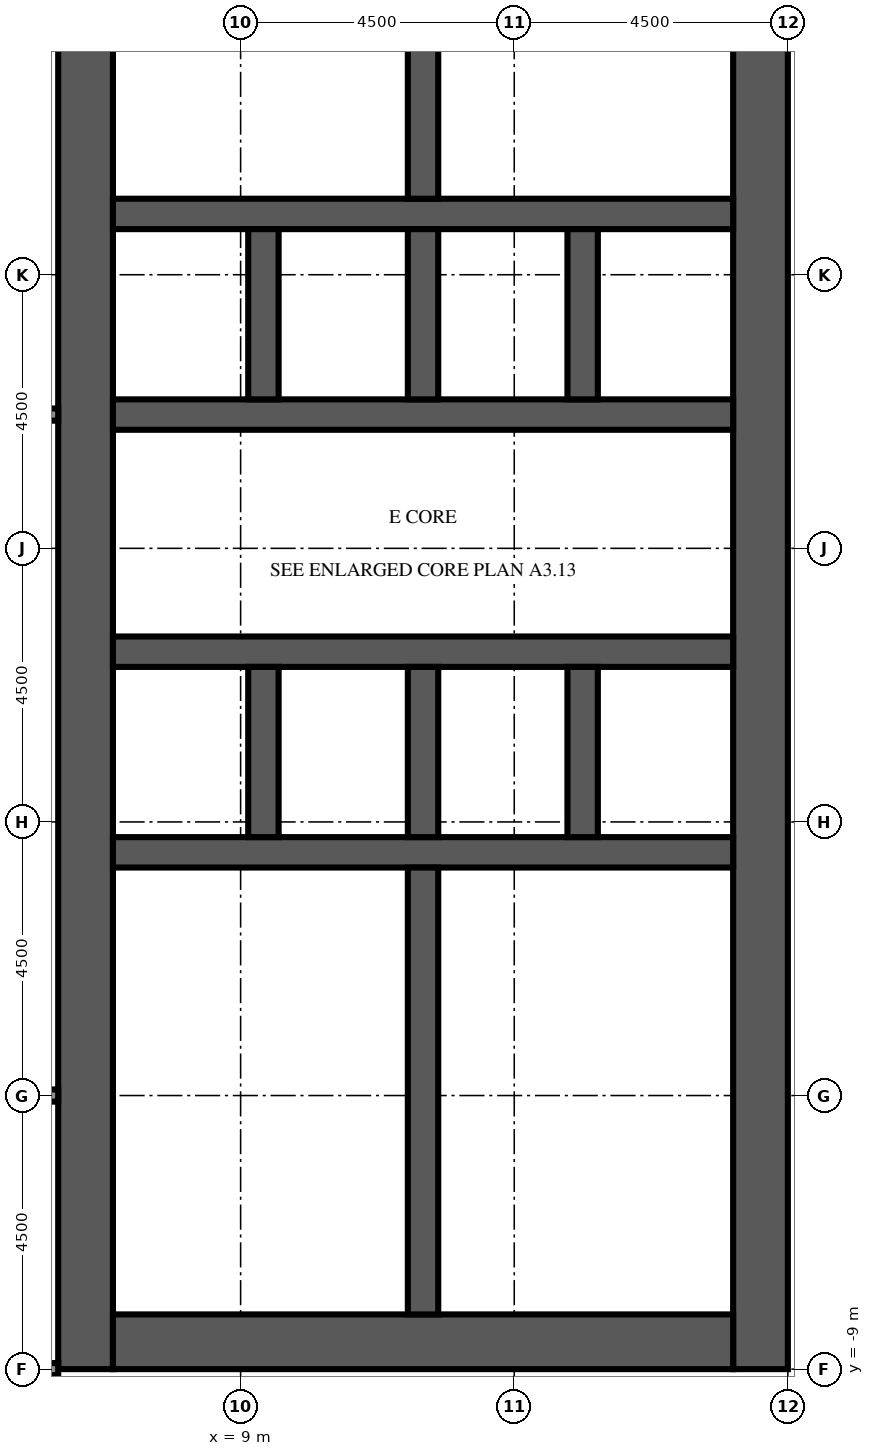
"""IFC4 building model, lengths in metres.
Left out: names, types, materials, properties, quantities, classifications, styles, units other than length and angle.
Written with IfcOpenShell. Run it as: python <this file> out.ifc"""

import sys

from ifc_helpers import new_model, si_unit, direction, frame, frame_2d, origin, place, context, subcontext, project, spatial, rectangle, extrude, element, fill, save


model = new_model("IFC4")
c1 = context("Model", 3, precision=1e-05, world=origin(), true_north=direction((0.0, 1.0)))
c2 = subcontext(c1, "Body", "Model", "MODEL_VIEW")
j1 = project(units=[si_unit("LENGTHUNIT", "METRE"), si_unit("PLANEANGLEUNIT", "RADIAN")], contexts=[c1])
p1 = place(None, origin())
s1 = spatial("IfcSite", under=j1, at=p1, CompositionType="ELEMENT")
p2 = place(p1, origin())
s2 = spatial("IfcBuilding", under=s1, at=p2, CompositionType="ELEMENT")
p3 = place(p2, frame((0.0, 0.0, 76.6)))
s3 = spatial("IfcBuildingStorey", under=s2, at=p3, CompositionType="ELEMENT", Elevation=76.6)
p4 = place(p3, frame((6.45, -9.0, 0.0), z_axis=(0.0, 0.0, 1.0), x_axis=(0.0, 1.0, 0.0)))
e1 = element("IfcWall", 1, at=p4, inside=s3, PredefinedType="SHEAR", context=c2, shape_type="SweptSolid", body=[
    extrude(rectangle(XDim=27.5, YDim=0.9, at=frame_2d((13.75, 0.0))), origin(), (0.0, 0.0, 1.0), 5.4),
])
p5 = place(p4, frame((12.55, 0.0, 0.0)))
e2 = element("IfcOpeningElement", 2, at=p5, cuts=e1, PredefinedType="OPENING", context=c2, shape_type="SweptSolid", body=[
    extrude(rectangle(XDim=2.4, YDim=2.4, at=frame_2d((1.2, 1.2))), frame((0.0, 0.46, 0.0), z_axis=(0.0, -1.0, 0.0), x_axis=(1.0, 0.0, 0.0)), (0.0, 0.0, 1.0), 0.92),
])
p6 = place(p4, frame((5.445, 0.0, 0.0)))
e3 = element("IfcOpeningElement", 3, at=p6, cuts=e1, PredefinedType="OPENING", context=c2, shape_type="SweptSolid", body=[
    extrude(rectangle(XDim=1.2, YDim=2.1, at=frame_2d((0.6, 1.05))), frame((0.0, 0.46, 0.0), z_axis=(0.0, -1.0, 0.0), x_axis=(1.0, 0.0, 0.0)), (0.0, 0.0, 1.0), 0.92),
])
p7 = place(p4, frame((19.485, 0.0, 0.0)))
e4 = element("IfcOpeningElement", 4, at=p7, cuts=e1, PredefinedType="OPENING", context=c2, shape_type="SweptSolid", body=[
    extrude(rectangle(XDim=1.0, YDim=2.1, at=frame_2d((0.5, 1.05))), frame((0.0, 0.46, 0.0), z_axis=(0.0, -1.0, 0.0), x_axis=(1.0, 0.0, 0.0)), (0.0, 0.0, 1.0), 0.92),
])
p8 = place(p4, frame((21.139, 0.0, 0.0)))
e5 = element("IfcOpeningElement", 5, at=p8, cuts=e1, PredefinedType="OPENING", context=c2, shape_type="SweptSolid", body=[
    extrude(rectangle(XDim=1.0, YDim=2.1, at=frame_2d((0.5, 1.05))), frame((0.0, 0.46, 0.0), z_axis=(0.0, -1.0, 0.0), x_axis=(1.0, 0.0, 0.0)), (0.0, 0.0, 1.0), 0.92),
])
p9 = place(p4, frame((23.16, 0.0, 0.0)))
e6 = element("IfcOpeningElement", 6, at=p9, cuts=e1, PredefinedType="OPENING", context=c2, shape_type="SweptSolid", body=[
    extrude(rectangle(XDim=1.0, YDim=2.1, at=frame_2d((0.5, 1.05))), frame((0.0, 0.46, 0.0), z_axis=(0.0, -1.0, 0.0), x_axis=(1.0, 0.0, 0.0)), (0.0, 0.0, 1.0), 0.92),
])
p10 = place(p4, frame((25.181, 0.0, 0.0)))
e7 = element("IfcOpeningElement", 7, at=p10, cuts=e1, PredefinedType="OPENING", context=c2, shape_type="SweptSolid", body=[
    extrude(rectangle(XDim=1.0, YDim=2.1, at=frame_2d((0.5, 1.05))), frame((0.0, 0.46, 0.0), z_axis=(0.0, -1.0, 0.0), x_axis=(1.0, 0.0, 0.0)), (0.0, 0.0, 1.0), 0.92),
])
p11 = place(p3, frame((17.55, -9.0, 0.0), z_axis=(0.0, 0.0, 1.0), x_axis=(0.0, 1.0, 0.0)))
e8 = element("IfcWall", 8, at=p11, inside=s3, PredefinedType="SHEAR", context=c2, shape_type="SweptSolid", body=[
    extrude(rectangle(XDim=27.5, YDim=0.9, at=frame_2d((13.75, 0.0))), origin(), (0.0, 0.0, 1.0), 5.4),
])
p12 = place(p11, frame((12.55, 0.0, 0.0)))
e9 = element("IfcOpeningElement", 9, at=p12, cuts=e8, PredefinedType="OPENING", context=c2, shape_type="SweptSolid", body=[
    extrude(rectangle(XDim=2.4, YDim=2.4, at=frame_2d((1.2, 1.2))), frame((0.0, 0.46, 0.0), z_axis=(0.0, -1.0, 0.0), x_axis=(1.0, 0.0, 0.0)), (0.0, 0.0, 1.0), 0.92),
])
p13 = place(p11, frame((6.825, 0.0, 0.0)))
e10 = element("IfcOpeningElement", 10, at=p13, cuts=e8, PredefinedType="OPENING", context=c2, shape_type="SweptSolid", body=[
    extrude(rectangle(XDim=1.2, YDim=2.1, at=frame_2d((0.6, 1.05))), frame((0.0, 0.46, 0.0), z_axis=(0.0, -1.0, 0.0), x_axis=(1.0, 0.0, 0.0)), (0.0, 0.0, 1.0), 0.92),
])
p14 = place(p11, frame((19.475, 0.0, 0.0)))
e11 = element("IfcOpeningElement", 11, at=p14, cuts=e8, PredefinedType="OPENING", context=c2, shape_type="SweptSolid", body=[
    extrude(rectangle(XDim=1.2, YDim=2.1, at=frame_2d((0.6, 1.05))), frame((0.0, 0.46, 0.0), z_axis=(0.0, -1.0, 0.0), x_axis=(1.0, 0.0, 0.0)), (0.0, 0.0, 1.0), 0.92),
])
p15 = place(p3, frame((6.9, -8.55, 0.0), z_axis=(0.0, 0.0, 1.0), x_axis=(1.0, 0.0, 0.0)))
e12 = element("IfcWall", 12, at=p15, inside=s3, PredefinedType="SHEAR", context=c2, shape_type="SweptSolid", body=[
    extrude(rectangle(XDim=10.2, YDim=0.9, at=frame_2d((5.1, 0.0))), origin(), (0.0, 0.0, 1.0), 5.4),
])
p16 = place(p3, frame((6.9, -0.5, 0.0), z_axis=(0.0, 0.0, 1.0), x_axis=(1.0, 0.0, 0.0)))
e13 = element("IfcWall", 13, at=p16, inside=s3, PredefinedType="SHEAR", context=c2, shape_type="SweptSolid", body=[
    extrude(rectangle(XDim=10.2, YDim=0.5, at=frame_2d((5.1, 0.0))), origin(), (0.0, 0.0, 1.0), 5.4),
])
p17 = place(p3, frame((6.9, 2.8, 0.0), z_axis=(0.0, 0.0, 1.0), x_axis=(1.0, 0.0, 0.0)))
e14 = element("IfcWall", 14, at=p17, inside=s3, PredefinedType="SHEAR", context=c2, shape_type="SweptSolid", body=[
    extrude(rectangle(XDim=10.2, YDim=0.5, at=frame_2d((5.1, 0.0))), origin(), (0.0, 0.0, 1.0), 5.4),
])
p18 = place(p17, frame((0.562, 0.0, 0.0)))
e15 = element("IfcOpeningElement", 15, at=p18, cuts=e14, PredefinedType="OPENING", context=c2, shape_type="SweptSolid", body=[
    extrude(rectangle(XDim=1.1, YDim=2.1, at=frame_2d((0.55, 1.05))), frame((0.0, 0.26, 0.0), z_axis=(0.0, -1.0, 0.0), x_axis=(1.0, 0.0, 0.0)), (0.0, 0.0, 1.0), 0.52),
])
p19 = place(p17, frame((3.238, 0.0, 0.0)))
e16 = element("IfcOpeningElement", 16, at=p19, cuts=e14, PredefinedType="OPENING", context=c2, shape_type="SweptSolid", body=[
    extrude(rectangle(XDim=1.1, YDim=2.1, at=frame_2d((0.55, 1.05))), frame((0.0, 0.26, 0.0), z_axis=(0.0, -1.0, 0.0), x_axis=(1.0, 0.0, 0.0)), (0.0, 0.0, 1.0), 0.52),
])
p20 = place(p17, frame((8.538, 0.0, 0.0)))
e17 = element("IfcOpeningElement", 17, at=p20, cuts=e14, PredefinedType="OPENING", context=c2, shape_type="SweptSolid", body=[
    extrude(rectangle(XDim=1.1, YDim=2.1, at=frame_2d((0.55, 1.05))), frame((0.0, 0.26, 0.0), z_axis=(0.0, -1.0, 0.0), x_axis=(1.0, 0.0, 0.0)), (0.0, 0.0, 1.0), 0.52),
])
p21 = place(p3, frame((6.9, 6.7, 0.0), z_axis=(0.0, 0.0, 1.0), x_axis=(1.0, 0.0, 0.0)))
e18 = element("IfcWall", 18, at=p21, inside=s3, PredefinedType="SHEAR", context=c2, shape_type="SweptSolid", body=[
    extrude(rectangle(XDim=10.2, YDim=0.5, at=frame_2d((5.1, 0.0))), origin(), (0.0, 0.0, 1.0), 5.4),
])
p22 = place(p21, frame((0.562, 0.0, 0.0)))
e19 = element("IfcOpeningElement", 19, at=p22, cuts=e18, PredefinedType="OPENING", context=c2, shape_type="SweptSolid", body=[
    extrude(rectangle(XDim=1.1, YDim=2.1, at=frame_2d((0.55, 1.05))), frame((0.0, 0.26, 0.0), z_axis=(0.0, -1.0, 0.0), x_axis=(1.0, 0.0, 0.0)), (0.0, 0.0, 1.0), 0.52),
])
p23 = place(p21, frame((3.288, 0.0, 0.0)))
e20 = element("IfcOpeningElement", 20, at=p23, cuts=e18, PredefinedType="OPENING", context=c2, shape_type="SweptSolid", body=[
    extrude(rectangle(XDim=1.0, YDim=2.1, at=frame_2d((0.5, 1.05))), frame((0.0, 0.26, 0.0), z_axis=(0.0, -1.0, 0.0), x_axis=(1.0, 0.0, 0.0)), (0.0, 0.0, 1.0), 0.52),
])
p24 = place(p21, frame((5.913, 0.0, 0.0)))
e21 = element("IfcOpeningElement", 21, at=p24, cuts=e18, PredefinedType="OPENING", context=c2, shape_type="SweptSolid", body=[
    extrude(rectangle(XDim=1.0, YDim=2.1, at=frame_2d((0.5, 1.05))), frame((0.0, 0.26, 0.0), z_axis=(0.0, -1.0, 0.0), x_axis=(1.0, 0.0, 0.0)), (0.0, 0.0, 1.0), 0.52),
])
p25 = place(p21, frame((8.587, 0.0, 0.0)))
e22 = element("IfcOpeningElement", 22, at=p25, cuts=e18, PredefinedType="OPENING", context=c2, shape_type="SweptSolid", body=[
    extrude(rectangle(XDim=1.0, YDim=2.1, at=frame_2d((0.5, 1.05))), frame((0.0, 0.26, 0.0), z_axis=(0.0, -1.0, 0.0), x_axis=(1.0, 0.0, 0.0)), (0.0, 0.0, 1.0), 0.52),
])
p26 = place(p3, frame((6.9, 10.0, 0.0), z_axis=(0.0, 0.0, 1.0), x_axis=(1.0, 0.0, 0.0)))
e23 = element("IfcWall", 23, at=p26, inside=s3, PredefinedType="SHEAR", context=c2, shape_type="SweptSolid", body=[
    extrude(rectangle(XDim=10.2, YDim=0.5, at=frame_2d((5.1, 0.0))), origin(), (0.0, 0.0, 1.0), 5.4),
])
for number, where, z_axis, x_axis in (
    (24, (9.375, -0.25, 0.0), (0.0, 0.0, 1.0), (0.0, 1.0, 0.0)),
    (25, (9.375, 6.95, 0.0), (0.0, 0.0, 1.0), (0.0, 1.0, 0.0)),
    (26, (12.0, -0.25, 0.0), (0.0, 0.0, 1.0), (0.0, 1.0, 0.0)),
    (27, (12.0, 6.95, 0.0), (0.0, 0.0, 1.0), (0.0, 1.0, 0.0)),
    (28, (14.625, -0.25, 0.0), (0.0, 0.0, 1.0), (0.0, 1.0, 0.0)),
    (29, (14.625, 6.95, 0.0), (0.0, 0.0, 1.0), (0.0, 1.0, 0.0)),
):
    element("IfcWall", number, at=place(p3, frame(where, z_axis=z_axis, x_axis=x_axis)), inside=s3, PredefinedType="SHEAR", context=c2, shape_type="SweptSolid", body=[
        extrude(rectangle(XDim=2.8, YDim=0.5, at=frame_2d((1.4, 0.0))), origin(), (0.0, 0.0, 1.0), 5.4),
    ])
for number, where, z_axis, x_axis in (
    (30, (12.0, -8.1, 0.0), (0.0, 0.0, 1.0), (0.0, 1.0, 0.0)),
    (31, (12.0, 10.25, 0.0), (0.0, 0.0, 1.0), (0.0, 1.0, 0.0)),
):
    element("IfcWall", number, at=place(p3, frame(where, z_axis=z_axis, x_axis=x_axis)), inside=s3, PredefinedType="SHEAR", context=c2, shape_type="SweptSolid", body=[
        extrude(rectangle(XDim=7.35, YDim=0.5, at=frame_2d((3.675, 0.0))), origin(), (0.0, 0.0, 1.0), 5.4),
    ])
p27 = place(p3, frame((6.9, -5.16, 0.0), z_axis=(0.0, 0.0, 1.0), x_axis=(1.0, 0.0, 0.0)))
e32 = element("IfcWall", 32, at=p27, inside=s3, PredefinedType="PARTITIONING", context=c2, shape_type="SweptSolid", body=[
    extrude(rectangle(XDim=1.5, YDim=0.1, at=frame_2d((0.75, 0.0))), origin(), (0.0, 0.0, 1.0), 4.95),
])
p28 = place(p27, frame((0.25, 0.0, 0.0)))
e33 = element("IfcOpeningElement", 33, at=p28, cuts=e32, PredefinedType="OPENING", context=c2, shape_type="SweptSolid", body=[
    extrude(rectangle(XDim=1.0, YDim=2.1, at=frame_2d((0.5, 1.05))), frame((0.0, 0.06, 0.0), z_axis=(0.0, -1.0, 0.0), x_axis=(1.0, 0.0, 0.0)), (0.0, 0.0, 1.0), 0.12),
])
p29 = place(p3, frame((8.4, -5.16, 0.0), z_axis=(0.0, 0.0, 1.0), x_axis=(0.0, 1.0, 0.0)))
e34 = element("IfcWall", 34, at=p29, inside=s3, PredefinedType="PARTITIONING", context=c2, shape_type="SweptSolid", body=[
    extrude(rectangle(XDim=2.205, YDim=0.1, at=frame_2d((1.103, 0.0))), origin(), (0.0, 0.0, 1.0), 4.95),
])
p30 = place(p29, frame((0.603, 0.0, 0.0)))
e35 = element("IfcOpeningElement", 35, at=p30, cuts=e34, PredefinedType="OPENING", context=c2, shape_type="SweptSolid", body=[
    extrude(rectangle(XDim=1.0, YDim=2.1, at=frame_2d((0.5, 1.05))), frame((0.0, 0.06, 0.0), z_axis=(0.0, -1.0, 0.0), x_axis=(1.0, 0.0, 0.0)), (0.0, 0.0, 1.0), 0.12),
])
p31 = place(p3, frame((8.4, -2.955, 0.0), z_axis=(0.0, 0.0, 1.0), x_axis=(0.0, 1.0, 0.0)))
e36 = element("IfcWall", 36, at=p31, inside=s3, PredefinedType="PARTITIONING", context=c2, shape_type="SweptSolid", body=[
    extrude(rectangle(XDim=2.205, YDim=0.1, at=frame_2d((1.103, 0.0))), origin(), (0.0, 0.0, 1.0), 4.95),
])
p32 = place(p31, frame((0.603, 0.0, 0.0)))
e37 = element("IfcOpeningElement", 37, at=p32, cuts=e36, PredefinedType="OPENING", context=c2, shape_type="SweptSolid", body=[
    extrude(rectangle(XDim=1.0, YDim=2.1, at=frame_2d((0.5, 1.05))), frame((0.0, 0.06, 0.0), z_axis=(0.0, -1.0, 0.0), x_axis=(1.0, 0.0, 0.0)), (0.0, 0.0, 1.0), 0.12),
])
for number, where, z_axis, x_axis in (
    (38, (8.4, -5.16, 0.0), (0.0, 0.0, 1.0), (1.0, 0.0, 0.0)),
    (39, (8.4, -2.955, 0.0), (0.0, 0.0, 1.0), (1.0, 0.0, 0.0)),
):
    element("IfcWall", number, at=place(p3, frame(where, z_axis=z_axis, x_axis=x_axis)), inside=s3, PredefinedType="PARTITIONING", context=c2, shape_type="SweptSolid", body=[
        extrude(rectangle(XDim=3.35, YDim=0.1, at=frame_2d((1.675, 0.0))), origin(), (0.0, 0.0, 1.0), 4.95),
    ])
p33 = place(p3, frame((6.9, 11.72, 0.0), z_axis=(0.0, 0.0, 1.0), x_axis=(1.0, 0.0, 0.0)))
e40 = element("IfcWall", 40, at=p33, inside=s3, PredefinedType="PARTITIONING", context=c2, shape_type="SweptSolid", body=[
    extrude(rectangle(XDim=4.85, YDim=0.1, at=frame_2d((2.425, 0.0))), origin(), (0.0, 0.0, 1.0), 4.95),
])
p34 = place(p3, frame((1.5, -9.0, 0.0), z_axis=(0.0, 0.0, 1.0), x_axis=(1.0, 0.0, 0.0)))
e41 = element("IfcWall", 41, at=p34, inside=s3, PredefinedType="PARTITIONING", context=c2, shape_type="SweptSolid", body=[
    extrude(rectangle(XDim=4.5, YDim=0.2, at=frame_2d((2.25, 0.0))), origin(), (0.0, 0.0, 1.0), 4.95),
])
p35 = place(p34, frame((1.1, 0.0, 0.0)))
e42 = element("IfcOpeningElement", 42, at=p35, cuts=e41, PredefinedType="OPENING", context=c2, shape_type="SweptSolid", body=[
    extrude(rectangle(XDim=1.0, YDim=2.1, at=frame_2d((0.5, 1.05))), frame((0.0, 0.11, 0.0), z_axis=(0.0, -1.0, 0.0), x_axis=(1.0, 0.0, 0.0)), (0.0, 0.0, 1.0), 0.22),
])
p36 = place(p3, frame((1.5, -4.5, 0.0), z_axis=(0.0, 0.0, 1.0), x_axis=(1.0, 0.0, 0.0)))
e43 = element("IfcWall", 43, at=p36, inside=s3, PredefinedType="PARTITIONING", context=c2, shape_type="SweptSolid", body=[
    extrude(rectangle(XDim=4.5, YDim=0.2, at=frame_2d((2.25, 0.0))), origin(), (0.0, 0.0, 1.0), 4.95),
])
p37 = place(p3, frame((1.5, 6.7, 0.0), z_axis=(0.0, 0.0, 1.0), x_axis=(1.0, 0.0, 0.0)))
e44 = element("IfcWall", 44, at=p37, inside=s3, PredefinedType="PARTITIONING", context=c2, shape_type="SweptSolid", body=[
    extrude(rectangle(XDim=4.5, YDim=0.2, at=frame_2d((2.25, 0.0))), origin(), (0.0, 0.0, 1.0), 4.95),
])
p38 = place(p37, frame((1.1, 0.0, 0.0)))
e45 = element("IfcOpeningElement", 45, at=p38, cuts=e44, PredefinedType="OPENING", context=c2, shape_type="SweptSolid", body=[
    extrude(rectangle(XDim=1.0, YDim=2.1, at=frame_2d((0.5, 1.05))), frame((0.0, 0.11, 0.0), z_axis=(0.0, -1.0, 0.0), x_axis=(1.0, 0.0, 0.0)), (0.0, 0.0, 1.0), 0.22),
])
p39 = place(p18, origin())
e46 = element("IfcDoor", 46, at=p39, inside=s3, OperationType="DOUBLE_DOOR_SLIDING", PredefinedType="DOOR", context=c2, shape_type="SweptSolid", body=[
    extrude(rectangle(XDim=1.1, YDim=2.1, at=frame_2d((0.55, 1.05))), frame((0.0, 0.025, 0.0), z_axis=(0.0, -1.0, 0.0), x_axis=(1.0, 0.0, 0.0)), (0.0, 0.0, 1.0), 0.05),
])
fill(e15, e46)
p40 = place(p19, origin())
e47 = element("IfcDoor", 47, at=p40, inside=s3, OperationType="DOUBLE_DOOR_SLIDING", PredefinedType="DOOR", context=c2, shape_type="SweptSolid", body=[
    extrude(rectangle(XDim=1.1, YDim=2.1, at=frame_2d((0.55, 1.05))), frame((0.0, 0.025, 0.0), z_axis=(0.0, -1.0, 0.0), x_axis=(1.0, 0.0, 0.0)), (0.0, 0.0, 1.0), 0.05),
])
fill(e16, e47)
p41 = place(p20, origin())
e48 = element("IfcDoor", 48, at=p41, inside=s3, OperationType="DOUBLE_DOOR_SLIDING", PredefinedType="DOOR", context=c2, shape_type="SweptSolid", body=[
    extrude(rectangle(XDim=1.1, YDim=2.1, at=frame_2d((0.55, 1.05))), frame((0.0, 0.025, 0.0), z_axis=(0.0, -1.0, 0.0), x_axis=(1.0, 0.0, 0.0)), (0.0, 0.0, 1.0), 0.05),
])
fill(e17, e48)
p42 = place(p22, origin())
e49 = element("IfcDoor", 49, at=p42, inside=s3, OperationType="DOUBLE_DOOR_SLIDING", PredefinedType="DOOR", context=c2, shape_type="SweptSolid", body=[
    extrude(rectangle(XDim=1.1, YDim=2.1, at=frame_2d((0.55, 1.05))), frame((0.0, 0.025, 0.0), z_axis=(0.0, -1.0, 0.0), x_axis=(1.0, 0.0, 0.0)), (0.0, 0.0, 1.0), 0.05),
])
fill(e19, e49)
p43 = place(p5, origin())
e50 = element("IfcDoor", 50, at=p43, inside=s3, OperationType="DOUBLE_DOOR_DOUBLE_SWING", PredefinedType="DOOR", context=c2, shape_type="SweptSolid", body=[
    extrude(rectangle(XDim=2.4, YDim=2.4, at=frame_2d((1.2, 1.2))), frame((0.0, 0.025, 0.0), z_axis=(0.0, -1.0, 0.0), x_axis=(1.0, 0.0, 0.0)), (0.0, 0.0, 1.0), 0.05),
])
fill(e2, e50)
p44 = place(p12, origin())
e51 = element("IfcDoor", 51, at=p44, inside=s3, OperationType="DOUBLE_DOOR_DOUBLE_SWING", PredefinedType="DOOR", context=c2, shape_type="SweptSolid", body=[
    extrude(rectangle(XDim=2.4, YDim=2.4, at=frame_2d((1.2, 1.2))), frame((0.0, 0.025, 0.0), z_axis=(0.0, -1.0, 0.0), x_axis=(1.0, 0.0, 0.0)), (0.0, 0.0, 1.0), 0.05),
])
fill(e9, e51)
p45 = place(p13, frame((1.2, 0.0, 0.0), z_axis=(0.0, 0.0, 1.0), x_axis=(-1.0, 0.0, 0.0)))
e52 = element("IfcDoor", 52, at=p45, inside=s3, OperationType="SINGLE_SWING_LEFT", PredefinedType="DOOR", context=c2, shape_type="SweptSolid", body=[
    extrude(rectangle(XDim=1.2, YDim=2.1, at=frame_2d((0.6, 1.05))), frame((0.0, 0.025, 0.0), z_axis=(0.0, -1.0, 0.0), x_axis=(1.0, 0.0, 0.0)), (0.0, 0.0, 1.0), 0.05),
])
fill(e10, e52)
p46 = place(p14, frame((1.2, 0.0, 0.0), z_axis=(0.0, 0.0, 1.0), x_axis=(-1.0, 0.0, 0.0)))
e53 = element("IfcDoor", 53, at=p46, inside=s3, OperationType="SINGLE_SWING_LEFT", PredefinedType="DOOR", context=c2, shape_type="SweptSolid", body=[
    extrude(rectangle(XDim=1.2, YDim=2.1, at=frame_2d((0.6, 1.05))), frame((0.0, 0.025, 0.0), z_axis=(0.0, -1.0, 0.0), x_axis=(1.0, 0.0, 0.0)), (0.0, 0.0, 1.0), 0.05),
])
fill(e11, e53)
p47 = place(p23, origin())
e54 = element("IfcDoor", 54, at=p47, inside=s3, OperationType="SINGLE_SWING_RIGHT", PredefinedType="DOOR", context=c2, shape_type="SweptSolid", body=[
    extrude(rectangle(XDim=1.0, YDim=2.1, at=frame_2d((0.5, 1.05))), frame((0.0, 0.025, 0.0), z_axis=(0.0, -1.0, 0.0), x_axis=(1.0, 0.0, 0.0)), (0.0, 0.0, 1.0), 0.05),
])
fill(e20, e54)
p48 = place(p24, origin())
e55 = element("IfcDoor", 55, at=p48, inside=s3, OperationType="SINGLE_SWING_LEFT", PredefinedType="DOOR", context=c2, shape_type="SweptSolid", body=[
    extrude(rectangle(XDim=1.0, YDim=2.1, at=frame_2d((0.5, 1.05))), frame((0.0, 0.025, 0.0), z_axis=(0.0, -1.0, 0.0), x_axis=(1.0, 0.0, 0.0)), (0.0, 0.0, 1.0), 0.05),
])
fill(e21, e55)
p49 = place(p25, origin())
e56 = element("IfcDoor", 56, at=p49, inside=s3, OperationType="SINGLE_SWING_RIGHT", PredefinedType="DOOR", context=c2, shape_type="SweptSolid", body=[
    extrude(rectangle(XDim=1.0, YDim=2.1, at=frame_2d((0.5, 1.05))), frame((0.0, 0.025, 0.0), z_axis=(0.0, -1.0, 0.0), x_axis=(1.0, 0.0, 0.0)), (0.0, 0.0, 1.0), 0.05),
])
fill(e22, e56)
p50 = place(p6, origin())
e57 = element("IfcDoor", 57, at=p50, inside=s3, OperationType="SINGLE_SWING_RIGHT", PredefinedType="DOOR", context=c2, shape_type="SweptSolid", body=[
    extrude(rectangle(XDim=1.2, YDim=2.1, at=frame_2d((0.6, 1.05))), frame((0.0, -0.375, 0.0), z_axis=(0.0, -1.0, 0.0), x_axis=(1.0, 0.0, 0.0)), (0.0, 0.0, 1.0), 0.05),
])
fill(e3, e57)
p51 = place(p28, origin())
e58 = element("IfcDoor", 58, at=p51, inside=s3, OperationType="SINGLE_SWING_LEFT", PredefinedType="DOOR", context=c2, shape_type="SweptSolid", body=[
    extrude(rectangle(XDim=1.0, YDim=2.1, at=frame_2d((0.5, 1.05))), frame((0.0, 0.025, 0.0), z_axis=(0.0, -1.0, 0.0), x_axis=(1.0, 0.0, 0.0)), (0.0, 0.0, 1.0), 0.05),
])
fill(e33, e58)
p52 = place(p30, origin())
e59 = element("IfcDoor", 59, at=p52, inside=s3, OperationType="SINGLE_SWING_RIGHT", PredefinedType="DOOR", context=c2, shape_type="SweptSolid", body=[
    extrude(rectangle(XDim=1.0, YDim=2.1, at=frame_2d((0.5, 1.05))), frame((0.0, 0.025, 0.0), z_axis=(0.0, -1.0, 0.0), x_axis=(1.0, 0.0, 0.0)), (0.0, 0.0, 1.0), 0.05),
])
fill(e35, e59)
p53 = place(p32, origin())
e60 = element("IfcDoor", 60, at=p53, inside=s3, OperationType="SINGLE_SWING_LEFT", PredefinedType="DOOR", context=c2, shape_type="SweptSolid", body=[
    extrude(rectangle(XDim=1.0, YDim=2.1, at=frame_2d((0.5, 1.05))), frame((0.0, 0.025, 0.0), z_axis=(0.0, -1.0, 0.0), x_axis=(1.0, 0.0, 0.0)), (0.0, 0.0, 1.0), 0.05),
])
fill(e37, e60)
p54 = place(p7, origin())
e61 = element("IfcDoor", 61, at=p54, inside=s3, OperationType="SINGLE_SWING_RIGHT", PredefinedType="DOOR", context=c2, shape_type="SweptSolid", body=[
    extrude(rectangle(XDim=1.0, YDim=2.1, at=frame_2d((0.5, 1.05))), frame((0.0, -0.375, 0.0), z_axis=(0.0, -1.0, 0.0), x_axis=(1.0, 0.0, 0.0)), (0.0, 0.0, 1.0), 0.05),
])
fill(e4, e61)
p55 = place(p8, origin())
e62 = element("IfcDoor", 62, at=p55, inside=s3, OperationType="SINGLE_SWING_LEFT", PredefinedType="DOOR", context=c2, shape_type="SweptSolid", body=[
    extrude(rectangle(XDim=1.0, YDim=2.1, at=frame_2d((0.5, 1.05))), frame((0.0, -0.375, 0.0), z_axis=(0.0, -1.0, 0.0), x_axis=(1.0, 0.0, 0.0)), (0.0, 0.0, 1.0), 0.05),
])
fill(e5, e62)
save(model, sys.argv[1])
